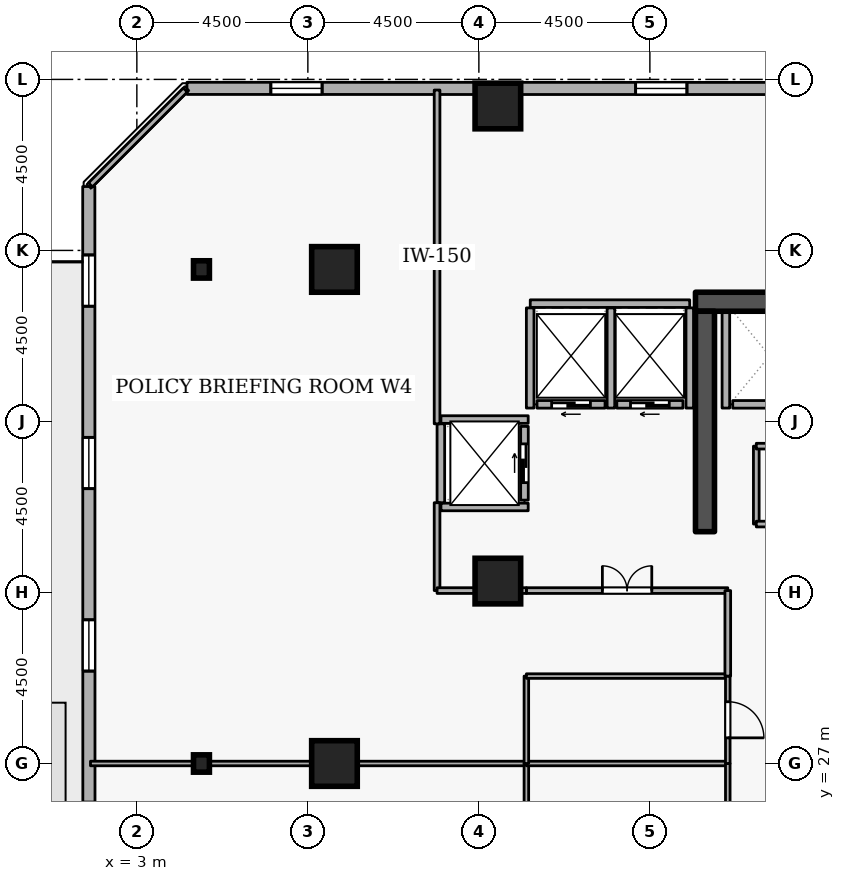
"""IFC4 building model, lengths in metres.
Left out: names, types, materials, properties, quantities, classifications, styles, units other than length and angle.
Written with IfcOpenShell. Run it as: python <this file> out.ifc"""

import sys

from ifc_helpers import new_model, si_unit, direction, frame, frame_2d, origin, origin_2d, place, context, subcontext, project, spatial, rectangle, i_section, extrude, element, fill, save


model = new_model("IFC4")
c1 = context("Model", 3, precision=1e-05, world=origin(), true_north=direction((0.0, 1.0)))
c2 = subcontext(c1, "Body", "Model", "MODEL_VIEW")
j1 = project(units=[si_unit("LENGTHUNIT", "METRE"), si_unit("PLANEANGLEUNIT", "RADIAN")], contexts=[c1])
p1 = place(None, origin())
s1 = spatial("IfcSite", under=j1, at=p1, CompositionType="ELEMENT")
p2 = place(p1, origin())
s2 = spatial("IfcBuilding", under=s1, at=p2, CompositionType="ELEMENT")
p3 = place(p2, frame((0.0, 0.0, 137.7)))
s3 = spatial("IfcBuildingStorey", under=s2, at=p3, CompositionType="ELEMENT", Elevation=137.7)
p4 = place(p3, frame((17.7, 39.15, 0.0), z_axis=(0.0, 0.0, 1.0), x_axis=(1.0, 0.0, 0.0)))
e1 = element("IfcWall", 1, at=p4, inside=s3, PredefinedType="SHEAR", context=c2, shape_type="SweptSolid", body=[
    extrude(rectangle(XDim=15.6, YDim=0.5, at=frame_2d((7.8, 0.0))), origin(), (0.0, 0.0, 1.0), 3.6),
])
p5 = place(p3, frame((17.95, 33.1, 0.0), z_axis=(0.0, 0.0, 1.0), x_axis=(0.0, 1.0, 0.0)))
e2 = element("IfcWall", 2, at=p5, inside=s3, PredefinedType="SHEAR", context=c2, shape_type="SweptSolid", body=[
    extrude(rectangle(XDim=5.8, YDim=0.5, at=frame_2d((2.9, 0.0))), origin(), (0.0, 0.0, 1.0), 3.6),
])
for number, where, z_axis, x_axis in (
    (3, (12.5, 44.3, 0.0), (0.0, 0.0, 1.0), (1.0, 0.0, 0.0)),
    (4, (8.2, 27.0, 0.0), (0.0, 0.0, 1.0), (1.0, 0.0, 0.0)),
    (5, (8.2, 40.0, 0.0), (0.0, 0.0, 1.0), (1.0, 0.0, 0.0)),
    (6, (12.5, 31.8, 0.0), (0.0, 0.0, 1.0), (1.0, 0.0, 0.0)),
):
    element("IfcColumn", number, at=place(p3, frame(where, z_axis=z_axis, x_axis=x_axis)), inside=s3, PredefinedType="COLUMN", context=c2, shape_type="SweptSolid", body=[
        extrude(rectangle(XDim=1.2, YDim=1.2, at=origin_2d()), origin(), (0.0, 0.0, 1.0), 3.6),
    ])
for number, where, z_axis, x_axis in (
    (7, (4.7, 27.0, 0.0), (0.0, 0.0, 1.0), (1.0, 0.0, 0.0)),
    (8, (4.7, 40.0, 0.0), (0.0, 0.0, 1.0), (1.0, 0.0, 0.0)),
):
    element("IfcColumn", number, at=place(p3, frame(where, z_axis=z_axis, x_axis=x_axis)), inside=s3, PredefinedType="COLUMN", context=c2, shape_type="SweptSolid", body=[
        extrude(i_section(OverallWidth=0.418, OverallDepth=0.456, WebThickness=0.042, FlangeThickness=0.067, FilletRadius=0.015, at=origin_2d()), origin(), (0.0, 0.0, 1.0), 3.6),
    ])
p6 = place(p3, frame((38.475, 44.757, 0.0), z_axis=(0.0, 0.0, 1.0), x_axis=(-0.99999997701, 0.000214431216, 0.0)))
e9 = element("IfcWall", 9, at=p6, inside=s3, PredefinedType="STANDARD", context=c2, shape_type="SweptSolid", body=[
    extrude(rectangle(XDim=34.156, YDim=0.32, at=frame_2d((17.078, 0.0))), origin(), (0.0, 0.0, 1.0), 2.66),
])
p7 = place(p6, frame((6.6, 0.0, 0.72)))
e10 = element("IfcOpeningElement", 10, at=p7, cuts=e9, PredefinedType="OPENING", context=c2, shape_type="SweptSolid", body=[
    extrude(rectangle(XDim=1.35, YDim=1.05, at=frame_2d((0.675, 0.525))), frame((0.0, 0.17, 0.0), z_axis=(0.0, -1.0, 0.0), x_axis=(1.0, 0.0, 0.0)), (0.0, 0.0, 1.0), 0.34),
])
p8 = place(p6, frame((16.2, 0.0, 0.72)))
e11 = element("IfcOpeningElement", 11, at=p8, cuts=e9, PredefinedType="OPENING", context=c2, shape_type="SweptSolid", body=[
    extrude(rectangle(XDim=1.35, YDim=1.05, at=frame_2d((0.675, 0.525))), frame((0.0, 0.17, 0.0), z_axis=(0.0, -1.0, 0.0), x_axis=(1.0, 0.0, 0.0)), (0.0, 0.0, 1.0), 0.34),
])
p9 = place(p6, frame((21.0, 0.0, 0.72)))
e12 = element("IfcOpeningElement", 12, at=p9, cuts=e9, PredefinedType="OPENING", context=c2, shape_type="SweptSolid", body=[
    extrude(rectangle(XDim=1.35, YDim=1.05, at=frame_2d((0.675, 0.525))), frame((0.0, 0.17, 0.0), z_axis=(0.0, -1.0, 0.0), x_axis=(1.0, 0.0, 0.0)), (0.0, 0.0, 1.0), 0.34),
])
p10 = place(p6, frame((30.6, 0.0, 0.72)))
e13 = element("IfcOpeningElement", 13, at=p10, cuts=e9, PredefinedType="OPENING", context=c2, shape_type="SweptSolid", body=[
    extrude(rectangle(XDim=1.35, YDim=1.05, at=frame_2d((0.675, 0.525))), frame((0.0, 0.17, 0.0), z_axis=(0.0, -1.0, 0.0), x_axis=(1.0, 0.0, 0.0)), (0.0, 0.0, 1.0), 0.34),
])
p11 = place(p3, frame((1.735, 42.181, 0.0), z_axis=(0.0, 0.0, 1.0), x_axis=(0.000214431216, -0.99999997701, 0.0)))
e14 = element("IfcWall", 14, at=p11, inside=s3, PredefinedType="STANDARD", context=c2, shape_type="SweptSolid", body=[
    extrude(rectangle(XDim=34.156, YDim=0.32, at=frame_2d((17.078, 0.0))), origin(), (0.0, 0.0, 1.0), 2.66),
])
p12 = place(p11, frame((18.878, 0.0, 0.0)))
e15 = element("IfcOpeningElement", 15, at=p12, cuts=e14, PredefinedType="OPENING", context=c2, shape_type="SweptSolid", body=[
    extrude(rectangle(XDim=1.0, YDim=2.08, at=frame_2d((0.5, 1.04))), frame((0.0, 0.17, 0.0), z_axis=(0.0, -1.0, 0.0), x_axis=(1.0, 0.0, 0.0)), (0.0, 0.0, 1.0), 0.34),
])
p13 = place(p11, frame((1.8, 0.0, 0.72)))
e16 = element("IfcOpeningElement", 16, at=p13, cuts=e14, PredefinedType="OPENING", context=c2, shape_type="SweptSolid", body=[
    extrude(rectangle(XDim=1.35, YDim=1.05, at=frame_2d((0.675, 0.525))), frame((0.0, 0.17, 0.0), z_axis=(0.0, -1.0, 0.0), x_axis=(1.0, 0.0, 0.0)), (0.0, 0.0, 1.0), 0.34),
])
p14 = place(p11, frame((6.6, 0.0, 0.72)))
e17 = element("IfcOpeningElement", 17, at=p14, cuts=e14, PredefinedType="OPENING", context=c2, shape_type="SweptSolid", body=[
    extrude(rectangle(XDim=1.35, YDim=1.05, at=frame_2d((0.675, 0.525))), frame((0.0, 0.17, 0.0), z_axis=(0.0, -1.0, 0.0), x_axis=(1.0, 0.0, 0.0)), (0.0, 0.0, 1.0), 0.34),
])
p15 = place(p11, frame((11.4, 0.0, 0.72)))
e18 = element("IfcOpeningElement", 18, at=p15, cuts=e14, PredefinedType="OPENING", context=c2, shape_type="SweptSolid", body=[
    extrude(rectangle(XDim=1.35, YDim=1.05, at=frame_2d((0.675, 0.525))), frame((0.0, 0.17, 0.0), z_axis=(0.0, -1.0, 0.0), x_axis=(1.0, 0.0, 0.0)), (0.0, 0.0, 1.0), 0.34),
])
p16 = place(p11, frame((16.2, 0.0, 0.72)))
e19 = element("IfcOpeningElement", 19, at=p16, cuts=e14, PredefinedType="OPENING", context=c2, shape_type="SweptSolid", body=[
    extrude(rectangle(XDim=1.35, YDim=1.05, at=frame_2d((0.675, 0.525))), frame((0.0, 0.17, 0.0), z_axis=(0.0, -1.0, 0.0), x_axis=(1.0, 0.0, 0.0)), (0.0, 0.0, 1.0), 0.34),
])
p17 = place(p11, frame((21.0, 0.0, 0.72)))
e20 = element("IfcOpeningElement", 20, at=p17, cuts=e14, PredefinedType="OPENING", context=c2, shape_type="SweptSolid", body=[
    extrude(rectangle(XDim=1.35, YDim=1.05, at=frame_2d((0.675, 0.525))), frame((0.0, 0.17, 0.0), z_axis=(0.0, -1.0, 0.0), x_axis=(1.0, 0.0, 0.0)), (0.0, 0.0, 1.0), 0.34),
])
p18 = place(p11, frame((25.8, 0.0, 0.72)))
e21 = element("IfcOpeningElement", 21, at=p18, cuts=e14, PredefinedType="OPENING", context=c2, shape_type="SweptSolid", body=[
    extrude(rectangle(XDim=1.35, YDim=1.05, at=frame_2d((0.675, 0.525))), frame((0.0, 0.17, 0.0), z_axis=(0.0, -1.0, 0.0), x_axis=(1.0, 0.0, 0.0)), (0.0, 0.0, 1.0), 0.34),
])
p19 = place(p11, frame((30.6, 0.0, 0.72)))
e22 = element("IfcOpeningElement", 22, at=p19, cuts=e14, PredefinedType="OPENING", context=c2, shape_type="SweptSolid", body=[
    extrude(rectangle(XDim=1.35, YDim=1.05, at=frame_2d((0.675, 0.525))), frame((0.0, 0.17, 0.0), z_axis=(0.0, -1.0, 0.0), x_axis=(1.0, 0.0, 0.0)), (0.0, 0.0, 1.0), 0.34),
])
p20 = place(p3, frame((20.62, 36.45, 0.0), z_axis=(0.0, 0.0, 1.0), x_axis=(-1.0, 0.0, 0.0)))
e23 = element("IfcWall", 23, at=p20, inside=s3, PredefinedType="STANDARD", context=c2, shape_type="SweptSolid", body=[
    extrude(rectangle(XDim=1.94, YDim=0.2, at=frame_2d((0.97, 0.0))), origin(), (0.0, 0.0, 1.0), 3.26),
])
p21 = place(p3, frame((17.37, 36.45, 0.0), z_axis=(0.0, 0.0, 1.0), x_axis=(-1.0, 0.0, 0.0)))
e24 = element("IfcWall", 24, at=p21, inside=s3, PredefinedType="STANDARD", context=c2, shape_type="SweptSolid", body=[
    extrude(rectangle(XDim=1.74, YDim=0.2, at=frame_2d((0.87, 0.0))), origin(), (0.0, 0.0, 1.0), 3.26),
])
p22 = place(p21, frame((0.36, 0.0, 0.0)))
e25 = element("IfcOpeningElement", 25, at=p22, cuts=e24, PredefinedType="OPENING", context=c2, shape_type="SweptSolid", body=[
    extrude(rectangle(XDim=1.02, YDim=2.06, at=frame_2d((0.51, 1.03))), frame((0.0, 0.11, 0.0), z_axis=(0.0, -1.0, 0.0), x_axis=(1.0, 0.0, 0.0)), (0.0, 0.0, 1.0), 0.22),
])
p23 = place(p3, frame((15.32, 36.45, 0.0), z_axis=(0.0, 0.0, 1.0), x_axis=(-1.0, 0.0, 0.0)))
e26 = element("IfcWall", 26, at=p23, inside=s3, PredefinedType="STANDARD", context=c2, shape_type="SweptSolid", body=[
    extrude(rectangle(XDim=1.79, YDim=0.2, at=frame_2d((0.895, 0.0))), origin(), (0.0, 0.0, 1.0), 3.26),
])
p24 = place(p23, frame((0.385, 0.0, 0.0)))
e27 = element("IfcOpeningElement", 27, at=p24, cuts=e26, PredefinedType="OPENING", context=c2, shape_type="SweptSolid", body=[
    extrude(rectangle(XDim=1.02, YDim=2.06, at=frame_2d((0.51, 1.03))), frame((0.0, 0.11, 0.0), z_axis=(0.0, -1.0, 0.0), x_axis=(1.0, 0.0, 0.0)), (0.0, 0.0, 1.0), 0.22),
])
p25 = place(p3, frame((13.2, 33.93, 0.0), z_axis=(0.0, 0.0, 1.0), x_axis=(0.0, 1.0, 0.0)))
e28 = element("IfcWall", 28, at=p25, inside=s3, PredefinedType="STANDARD", context=c2, shape_type="SweptSolid", body=[
    extrude(rectangle(XDim=1.94, YDim=0.2, at=frame_2d((0.97, 0.0))), origin(), (0.0, 0.0, 1.0), 3.26),
])
p26 = place(p25, frame((0.46, 0.0, 0.0)))
e29 = element("IfcOpeningElement", 29, at=p26, cuts=e28, PredefinedType="OPENING", context=c2, shape_type="SweptSolid", body=[
    extrude(rectangle(XDim=1.02, YDim=2.06, at=frame_2d((0.51, 1.03))), frame((0.0, 0.11, 0.0), z_axis=(0.0, -1.0, 0.0), x_axis=(1.0, 0.0, 0.0)), (0.0, 0.0, 1.0), 0.22),
])
p27 = place(p3, frame((18.5, 36.352, 0.0), z_axis=(0.0, 0.0, 1.0), x_axis=(0.0, 1.0, 0.0)))
e30 = element("IfcWall", 30, at=p27, inside=s3, PredefinedType="STANDARD", context=c2, shape_type="SweptSolid", body=[
    extrude(rectangle(XDim=2.536, YDim=0.2, at=frame_2d((1.268, 0.0))), origin(), (0.0, 0.0, 1.0), 3.26),
])
p28 = place(p3, frame((13.352, 39.1, 0.0), z_axis=(0.0, 0.0, 1.0), x_axis=(1.0, 0.0, 0.0)))
e31 = element("IfcWall", 31, at=p28, inside=s3, PredefinedType="STANDARD", context=c2, shape_type="SweptSolid", body=[
    extrude(rectangle(XDim=4.196, YDim=0.2, at=frame_2d((2.098, 0.0))), origin(), (0.0, 0.0, 1.0), 3.26),
])
p29 = place(p3, frame((17.55, 36.352, 0.0), z_axis=(0.0, 0.0, 1.0), x_axis=(0.0, 1.0, 0.0)))
e32 = element("IfcWall", 32, at=p29, inside=s3, PredefinedType="STANDARD", context=c2, shape_type="SweptSolid", body=[
    extrude(rectangle(XDim=2.636, YDim=0.2, at=frame_2d((1.318, 0.0))), origin(), (0.0, 0.0, 1.0), 2.465),
])
for number, where, z_axis, x_axis in (
    (33, (15.475, 36.352, 0.0), (0.0, 0.0, 1.0), (0.0, 1.0, 0.0)),
    (34, (13.35, 36.352, 0.0), (0.0, 0.0, 1.0), (0.0, 1.0, 0.0)),
):
    element("IfcWall", number, at=place(p3, frame(where, z_axis=z_axis, x_axis=x_axis)), inside=s3, PredefinedType="STANDARD", context=c2, shape_type="SweptSolid", body=[
        extrude(rectangle(XDim=2.636, YDim=0.2, at=frame_2d((1.318, 0.0))), origin(), (0.0, 0.0, 1.0), 3.26),
    ])
for number, where, z_axis, x_axis in (
    (35, (11.002, 36.05, 0.0), (0.0, 0.0, 1.0), (1.0, 0.0, 0.0)),
    (36, (11.002, 33.75, 0.0), (0.0, 0.0, 1.0), (1.0, 0.0, 0.0)),
):
    element("IfcWall", number, at=place(p3, frame(where, z_axis=z_axis, x_axis=x_axis)), inside=s3, PredefinedType="STANDARD", context=c2, shape_type="SweptSolid", body=[
        extrude(rectangle(XDim=2.296, YDim=0.2, at=frame_2d((1.148, 0.0))), origin(), (0.0, 0.0, 1.0), 3.26),
    ])
p30 = place(p3, frame((11.0, 33.862, 0.0), z_axis=(0.0, 0.0, 1.0), x_axis=(0.0, 1.0, 0.0)))
e37 = element("IfcWall", 37, at=p30, inside=s3, PredefinedType="STANDARD", context=c2, shape_type="SweptSolid", body=[
    extrude(rectangle(XDim=2.076, YDim=0.2, at=frame_2d((1.038, 0.0))), origin(), (0.0, 0.0, 1.0), 3.26),
])
p31 = place(p3, frame((19.3, 33.3, 0.0), z_axis=(0.0, 0.0, 1.0), x_axis=(0.0, 1.0, 0.0)))
e38 = element("IfcWall", 38, at=p31, inside=s3, PredefinedType="PARTITIONING", context=c2, shape_type="SweptSolid", body=[
    extrude(rectangle(XDim=2.05, YDim=0.15, at=frame_2d((1.025, 0.0))), origin(), (0.0, 0.0, 1.0), 3.26),
])
p32 = place(p3, frame((19.3, 35.35, 0.0), z_axis=(0.0, 0.0, 1.0), x_axis=(1.0, 0.0, 0.0)))
e39 = element("IfcWall", 39, at=p32, inside=s3, PredefinedType="PARTITIONING", context=c2, shape_type="SweptSolid", body=[
    extrude(rectangle(XDim=3.25, YDim=0.15, at=frame_2d((1.625, 0.0))), origin(), (0.0, 0.0, 1.0), 3.26),
])
p33 = place(p3, frame((22.55, 33.3, 0.0), z_axis=(0.0, 0.0, 1.0), x_axis=(-1.0, 0.0, 0.0)))
e40 = element("IfcWall", 40, at=p33, inside=s3, PredefinedType="PARTITIONING", context=c2, shape_type="SweptSolid", body=[
    extrude(rectangle(XDim=3.25, YDim=0.15, at=frame_2d((1.625, 0.0))), origin(), (0.0, 0.0, 1.0), 3.26),
])
p34 = place(p33, frame((1.165, 0.0, 0.0)))
e41 = element("IfcOpeningElement", 41, at=p34, cuts=e40, PredefinedType="OPENING", context=c2, shape_type="SweptSolid", body=[
    extrude(rectangle(XDim=0.92, YDim=2.08, at=frame_2d((0.46, 1.04))), frame((0.0, 0.085, 0.0), z_axis=(0.0, -1.0, 0.0), x_axis=(1.0, 0.0, 0.0)), (0.0, 0.0, 1.0), 0.17),
])
p35 = place(p3, frame((1.78, 27.0, 0.0), z_axis=(0.0, 0.0, 1.0), x_axis=(1.0, 0.0, 0.0)))
e42 = element("IfcWall", 42, at=p35, inside=s3, PredefinedType="PARTITIONING", context=c2, shape_type="SweptSolid", body=[
    extrude(rectangle(XDim=11.47, YDim=0.12, at=frame_2d((5.735, 0.0))), origin(), (0.0, 0.0, 1.0), 2.802),
])
p36 = place(p3, frame((13.25, 27.0, 0.0), z_axis=(0.0, 0.0, 1.0), x_axis=(0.0, -1.0, 0.0)))
e43 = element("IfcWall", 43, at=p36, inside=s3, PredefinedType="PARTITIONING", context=c2, shape_type="SweptSolid", body=[
    extrude(rectangle(XDim=4.55, YDim=0.12, at=frame_2d((2.275, 0.0))), origin(), (0.0, 0.0, 1.0), 3.26),
])
p37 = place(p3, frame((13.25, 27.0, 0.0), z_axis=(0.0, 0.0, 1.0), x_axis=(1.0, 0.0, 0.0)))
e44 = element("IfcWall", 44, at=p37, inside=s3, PredefinedType="PARTITIONING", context=c2, shape_type="SweptSolid", body=[
    extrude(rectangle(XDim=5.3, YDim=0.12, at=frame_2d((2.65, 0.0))), origin(), (0.0, 0.0, 1.0), 3.26),
])
p38 = place(p3, frame((18.55, 27.0, 0.0), z_axis=(0.0, 0.0, 1.0), x_axis=(0.0, -1.0, 0.0)))
e45 = element("IfcWall", 45, at=p38, inside=s3, PredefinedType="PARTITIONING", context=c2, shape_type="SweptSolid", body=[
    extrude(rectangle(XDim=4.55, YDim=0.12, at=frame_2d((2.275, 0.0))), origin(), (0.0, 0.0, 1.0), 3.26),
])
p39 = place(p3, frame((13.25, 27.0, 0.0), z_axis=(0.0, 0.0, 1.0), x_axis=(0.0, 1.0, 0.0)))
e46 = element("IfcWall", 46, at=p39, inside=s3, PredefinedType="PARTITIONING", context=c2, shape_type="SweptSolid", body=[
    extrude(rectangle(XDim=2.3, YDim=0.12, at=frame_2d((1.15, 0.0))), origin(), (0.0, 0.0, 1.0), 3.26),
])
p40 = place(p3, frame((13.25, 29.3, 0.0), z_axis=(0.0, 0.0, 1.0), x_axis=(1.0, 0.0, 0.0)))
e47 = element("IfcWall", 47, at=p40, inside=s3, PredefinedType="PARTITIONING", context=c2, shape_type="SweptSolid", body=[
    extrude(rectangle(XDim=5.3, YDim=0.12, at=frame_2d((2.65, 0.0))), origin(), (0.0, 0.0, 1.0), 3.26),
])
p41 = place(p3, frame((18.55, 29.3, 0.0), z_axis=(0.0, 0.0, 1.0), x_axis=(0.0, -1.0, 0.0)))
e48 = element("IfcWall", 48, at=p41, inside=s3, PredefinedType="PARTITIONING", context=c2, shape_type="SweptSolid", body=[
    extrude(rectangle(XDim=2.3, YDim=0.12, at=frame_2d((1.15, 0.0))), origin(), (0.0, 0.0, 1.0), 3.26),
])
p42 = place(p41, frame((0.675, 0.0, 0.0)))
e49 = element("IfcOpeningElement", 49, at=p42, cuts=e48, PredefinedType="OPENING", context=c2, shape_type="SweptSolid", body=[
    extrude(rectangle(XDim=0.95, YDim=2.1, at=frame_2d((0.475, 1.05))), frame((0.0, 0.07, 0.0), z_axis=(0.0, -1.0, 0.0), x_axis=(1.0, 0.0, 0.0)), (0.0, 0.0, 1.0), 0.14),
])
p43 = place(p3, frame((13.25, 31.55, 0.0), z_axis=(0.0, 0.0, 1.0), x_axis=(1.0, 0.0, 0.0)))
e50 = element("IfcWall", 50, at=p43, inside=s3, PredefinedType="PARTITIONING", context=c2, shape_type="SweptSolid", body=[
    extrude(rectangle(XDim=5.3, YDim=0.15, at=frame_2d((2.65, 0.0))), origin(), (0.0, 0.0, 1.0), 3.26),
])
p44 = place(p43, frame((2.0, 0.0, 0.0)))
e51 = element("IfcOpeningElement", 51, at=p44, cuts=e50, PredefinedType="OPENING", context=c2, shape_type="SweptSolid", body=[
    extrude(rectangle(XDim=1.3, YDim=2.12, at=frame_2d((0.65, 1.06))), frame((0.0, 0.085, 0.0), z_axis=(0.0, -1.0, 0.0), x_axis=(1.0, 0.0, 0.0)), (0.0, 0.0, 1.0), 0.17),
])
p45 = place(p3, frame((18.55, 31.55, 0.0), z_axis=(0.0, 0.0, 1.0), x_axis=(0.0, -1.0, 0.0)))
e52 = element("IfcWall", 52, at=p45, inside=s3, PredefinedType="PARTITIONING", context=c2, shape_type="SweptSolid", body=[
    extrude(rectangle(XDim=2.25, YDim=0.15, at=frame_2d((1.125, 0.0))), origin(), (0.0, 0.0, 1.0), 3.26),
])
p46 = place(p3, frame((1.78, 42.225, 0.0), z_axis=(0.0, 0.0, 1.0), x_axis=(0.707106781187, 0.707106781187, 0.0)))
e53 = element("IfcWall", 53, at=p46, inside=s3, PredefinedType="PARTITIONING", context=c2, shape_type="SweptSolid", body=[
    extrude(rectangle(XDim=3.528, YDim=0.15, at=frame_2d((1.764, 0.0))), origin(), (0.0, 0.0, 1.0), 3.26),
])
p47 = place(p3, frame((10.9, 44.72, 0.0), z_axis=(0.0, 0.0, 1.0), x_axis=(0.0, -1.0, 0.0)))
e54 = element("IfcWall", 54, at=p47, inside=s3, PredefinedType="PARTITIONING", context=c2, shape_type="SweptSolid", body=[
    extrude(rectangle(XDim=8.782, YDim=0.15, at=frame_2d((4.391, 0.0))), origin(), (0.0, 0.0, 1.0), 3.26),
])
p48 = place(p3, frame((10.9, 33.862, 0.0), z_axis=(0.0, 0.0, 1.0), x_axis=(0.0, -1.0, 0.0)))
e55 = element("IfcWall", 55, at=p48, inside=s3, PredefinedType="PARTITIONING", context=c2, shape_type="SweptSolid", body=[
    extrude(rectangle(XDim=2.312, YDim=0.15, at=frame_2d((1.156, 0.0))), origin(), (0.0, 0.0, 1.0), 3.26),
])
p49 = place(p3, frame((10.9, 31.55, 0.0), z_axis=(0.0, 0.0, 1.0), x_axis=(1.0, 0.0, 0.0)))
e56 = element("IfcWall", 56, at=p49, inside=s3, PredefinedType="PARTITIONING", context=c2, shape_type="SweptSolid", body=[
    extrude(rectangle(XDim=2.35, YDim=0.15, at=frame_2d((1.175, 0.0))), origin(), (0.0, 0.0, 1.0), 3.26),
])
p50 = place(p9, origin())
e57 = element("IfcWindow", 57, at=p50, inside=s3, PartitioningType="SINGLE_PANEL", PredefinedType="WINDOW", context=c2, shape_type="SweptSolid", body=[
    extrude(rectangle(XDim=1.35, YDim=1.05, at=frame_2d((0.675, 0.525))), frame((0.0, 0.03, 0.0), z_axis=(0.0, -1.0, 0.0), x_axis=(1.0, 0.0, 0.0)), (0.0, 0.0, 1.0), 0.06),
])
fill(e12, e57)
p51 = place(p10, origin())
e58 = element("IfcWindow", 58, at=p51, inside=s3, PartitioningType="SINGLE_PANEL", PredefinedType="WINDOW", context=c2, shape_type="SweptSolid", body=[
    extrude(rectangle(XDim=1.35, YDim=1.05, at=frame_2d((0.675, 0.525))), frame((0.0, 0.03, 0.0), z_axis=(0.0, -1.0, 0.0), x_axis=(1.0, 0.0, 0.0)), (0.0, 0.0, 1.0), 0.06),
])
fill(e13, e58)
p52 = place(p13, origin())
e59 = element("IfcWindow", 59, at=p52, inside=s3, PartitioningType="SINGLE_PANEL", PredefinedType="WINDOW", context=c2, shape_type="SweptSolid", body=[
    extrude(rectangle(XDim=1.35, YDim=1.05, at=frame_2d((0.675, 0.525))), frame((0.0, 0.03, 0.0), z_axis=(0.0, -1.0, 0.0), x_axis=(1.0, 0.0, 0.0)), (0.0, 0.0, 1.0), 0.06),
])
fill(e16, e59)
p53 = place(p14, origin())
e60 = element("IfcWindow", 60, at=p53, inside=s3, PartitioningType="SINGLE_PANEL", PredefinedType="WINDOW", context=c2, shape_type="SweptSolid", body=[
    extrude(rectangle(XDim=1.35, YDim=1.05, at=frame_2d((0.675, 0.525))), frame((0.0, 0.03, 0.0), z_axis=(0.0, -1.0, 0.0), x_axis=(1.0, 0.0, 0.0)), (0.0, 0.0, 1.0), 0.06),
])
fill(e17, e60)
p54 = place(p15, origin())
e61 = element("IfcWindow", 61, at=p54, inside=s3, PartitioningType="SINGLE_PANEL", PredefinedType="WINDOW", context=c2, shape_type="SweptSolid", body=[
    extrude(rectangle(XDim=1.35, YDim=1.05, at=frame_2d((0.675, 0.525))), frame((0.0, 0.03, 0.0), z_axis=(0.0, -1.0, 0.0), x_axis=(1.0, 0.0, 0.0)), (0.0, 0.0, 1.0), 0.06),
])
fill(e18, e61)
p55 = place(p22, origin())
e62 = element("IfcDoor", 62, at=p55, inside=s3, OperationType="SLIDING_TO_LEFT", PredefinedType="DOOR", context=c2, shape_type="SweptSolid", body=[
    extrude(rectangle(XDim=1.02, YDim=2.06, at=frame_2d((0.51, 1.03))), frame((0.0, 0.025, 0.0), z_axis=(0.0, -1.0, 0.0), x_axis=(1.0, 0.0, 0.0)), (0.0, 0.0, 1.0), 0.05),
])
fill(e25, e62)
p56 = place(p24, origin())
e63 = element("IfcDoor", 63, at=p56, inside=s3, OperationType="SLIDING_TO_LEFT", PredefinedType="DOOR", context=c2, shape_type="SweptSolid", body=[
    extrude(rectangle(XDim=1.02, YDim=2.06, at=frame_2d((0.51, 1.03))), frame((0.0, 0.025, 0.0), z_axis=(0.0, -1.0, 0.0), x_axis=(1.0, 0.0, 0.0)), (0.0, 0.0, 1.0), 0.05),
])
fill(e27, e63)
p57 = place(p26, origin())
e64 = element("IfcDoor", 64, at=p57, inside=s3, OperationType="SLIDING_TO_LEFT", PredefinedType="DOOR", context=c2, shape_type="SweptSolid", body=[
    extrude(rectangle(XDim=1.02, YDim=2.06, at=frame_2d((0.51, 1.03))), frame((0.0, 0.025, 0.0), z_axis=(0.0, -1.0, 0.0), x_axis=(1.0, 0.0, 0.0)), (0.0, 0.0, 1.0), 0.05),
])
fill(e29, e64)
p58 = place(p42, origin())
e65 = element("IfcDoor", 65, at=p58, inside=s3, OperationType="SINGLE_SWING_RIGHT", PredefinedType="DOOR", context=c2, shape_type="SweptSolid", body=[
    extrude(rectangle(XDim=0.95, YDim=2.1, at=frame_2d((0.475, 1.05))), frame((0.0, 0.025, 0.0), z_axis=(0.0, -1.0, 0.0), x_axis=(1.0, 0.0, 0.0)), (0.0, 0.0, 1.0), 0.05),
])
fill(e49, e65)
p59 = place(p44, origin())
e66 = element("IfcDoor", 66, at=p59, inside=s3, OperationType="DOUBLE_DOOR_SINGLE_SWING", PredefinedType="DOOR", context=c2, shape_type="SweptSolid", body=[
    extrude(rectangle(XDim=1.3, YDim=2.12, at=frame_2d((0.65, 1.06))), frame((0.0, 0.025, 0.0), z_axis=(0.0, -1.0, 0.0), x_axis=(1.0, 0.0, 0.0)), (0.0, 0.0, 1.0), 0.05),
])
fill(e51, e66)
save(model, sys.argv[1])
